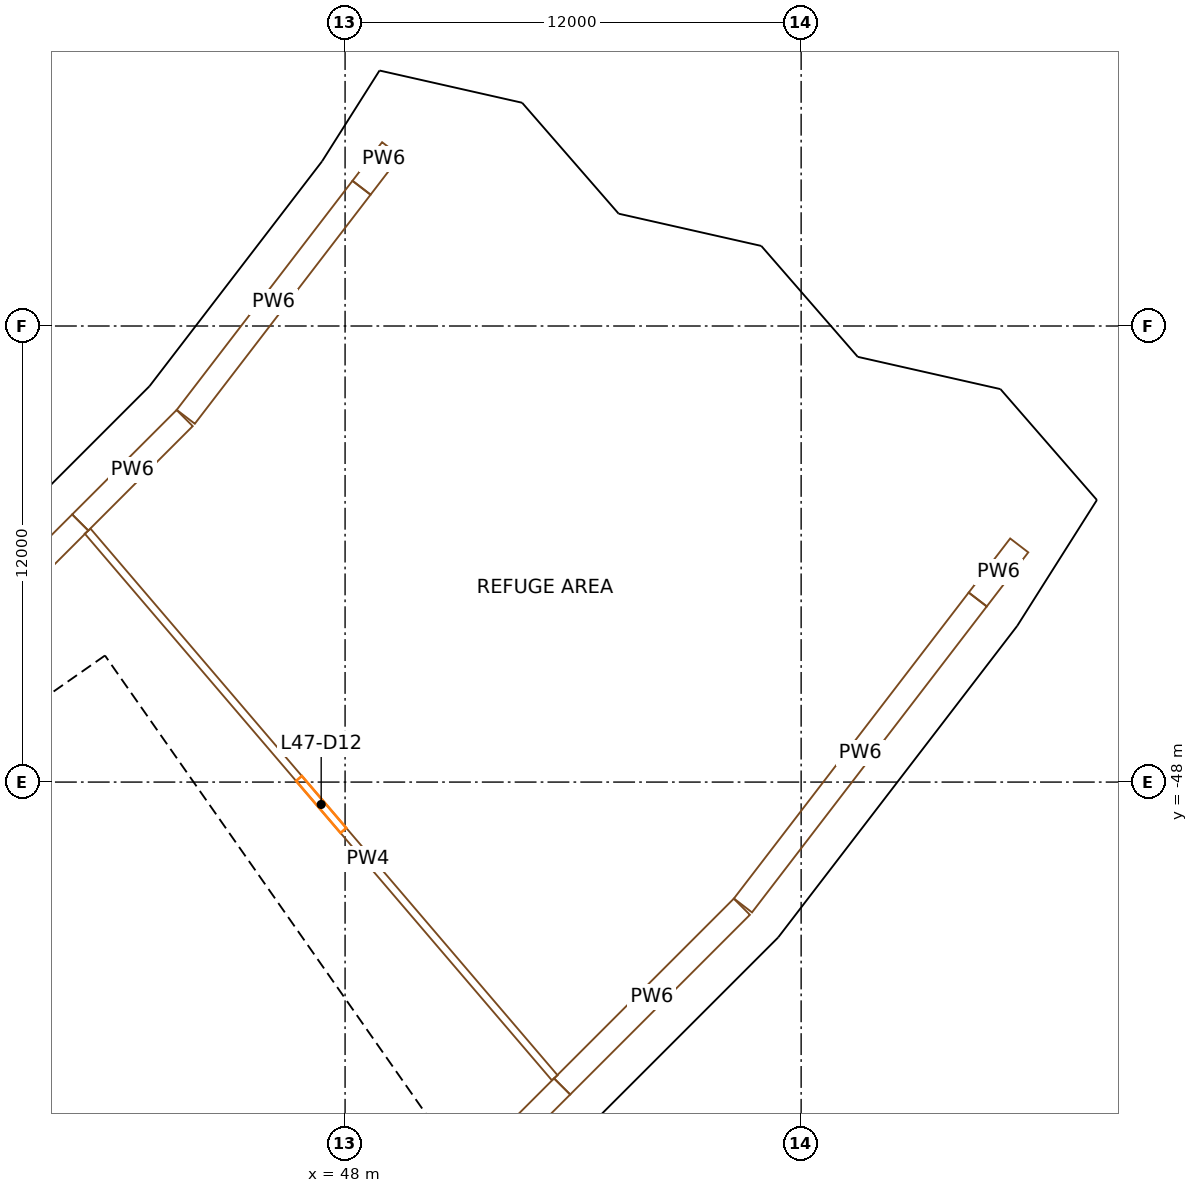
"""IFC4 building model, lengths in metres.
Left out: names, types, materials, properties, quantities, classifications, styles, units other than length and angle.
Written with IfcOpenShell. Run it as: python <this file> out.ifc"""

import sys

from ifc_helpers import new_model, si_unit, direction, frame, frame_2d, origin, origin_2d, place, context, subcontext, project, spatial, rectangle, extrude, element, fill, save


model = new_model("IFC4")
c1 = context("Model", 3, precision=1e-05, world=origin(), true_north=direction((0.0, 1.0)))
c2 = subcontext(c1, "Body", "Model", "MODEL_VIEW")
j1 = project(units=[si_unit("LENGTHUNIT", "METRE"), si_unit("PLANEANGLEUNIT", "RADIAN")], contexts=[c1])
p1 = place(None, origin())
s1 = spatial("IfcSite", under=j1, at=p1, CompositionType="ELEMENT")
p2 = place(p1, origin())
s2 = spatial("IfcBuilding", under=s1, at=p2, CompositionType="ELEMENT")
p3 = place(p2, frame((0.0, 0.0, 198.7)))
s3 = spatial("IfcBuildingStorey", under=s2, at=p3, CompositionType="ELEMENT", Elevation=198.7)
for number, where, z_axis, x_axis in (
    (1, (43.795, -38.407, 0.0), (0.0, 0.0, 1.0), (0.659, 0.752, 0.0)),
    (2, (58.456, -51.264, 0.0), (0.0, 0.0, 1.0), (0.659, 0.752, 0.0)),
    (3, (48.433, -32.362, 0.0), (0.0, 0.0, 1.0), (0.556, 0.831, 0.0)),
    (4, (64.647, -43.196, 0.0), (0.0, 0.0, 1.0), (0.556, 0.831, 0.0)),
):
    element("IfcColumn", number, at=place(p3, frame(where, z_axis=z_axis, x_axis=x_axis)), inside=s3, PredefinedType="COLUMN", context=c2, shape_type="SweptSolid", body=[
        extrude(rectangle(XDim=1.1, YDim=1.3, at=origin_2d()), origin(), (0.0, 0.0, 1.0), 5.0),
    ])
p4 = place(p3, frame((49.483, -57.031, 0.0), z_axis=(0.0, 0.0, 1.0), x_axis=(-0.573560421458, 0.819163257805, 0.0)))
e5 = element("IfcWall", 5, at=p4, inside=s3, PredefinedType="SHEAR", context=c2, shape_type="SweptSolid", body=[
    extrude(rectangle(XDim=14.2, YDim=0.6, at=frame_2d((7.1, 0.0))), origin(), (0.0, 0.0, 1.0), 4.7),
])
p5 = place(p4, frame((6.4, 0.0, 0.0)))
e6 = element("IfcOpeningElement", 6, at=p5, cuts=e5, PredefinedType="OPENING", context=c2, shape_type="SweptSolid", body=[
    extrude(rectangle(XDim=1.4, YDim=2.1, at=frame_2d((0.7, 1.05))), frame((0.0, 0.31, 0.0), z_axis=(0.0, -1.0, 0.0), x_axis=(1.0, 0.0, 0.0)), (0.0, 0.0, 1.0), 0.62),
])
p6 = place(p3, frame((28.941, -54.447, 0.0), z_axis=(0.0, 0.0, 1.0), x_axis=(0.819153391756, 0.573574511963, 0.0)))
e7 = element("IfcWall", 7, at=p6, inside=s3, PredefinedType="SHEAR", context=c2, shape_type="SweptSolid", body=[
    extrude(rectangle(XDim=15.045, YDim=0.6, at=frame_2d((7.523, 0.0))), origin(), (0.0, 0.0, 1.0), 4.7),
])
p7 = place(p6, frame((3.45, 0.0, 0.0)))
e8 = element("IfcOpeningElement", 8, at=p7, cuts=e7, PredefinedType="OPENING", context=c2, shape_type="SweptSolid", body=[
    extrude(rectangle(XDim=1.0, YDim=2.1, at=frame_2d((0.5, 1.05))), frame((0.0, 0.31, 0.0), z_axis=(0.0, -1.0, 0.0), x_axis=(1.0, 0.0, 0.0)), (0.0, 0.0, 1.0), 0.62),
])
p8 = place(p6, frame((13.495, 0.0, 0.0)))
e9 = element("IfcOpeningElement", 9, at=p8, cuts=e7, PredefinedType="OPENING", context=c2, shape_type="SweptSolid", body=[
    extrude(rectangle(XDim=1.1, YDim=2.1, at=frame_2d((0.55, 1.05))), frame((0.0, 0.31, 0.0), z_axis=(0.0, -1.0, 0.0), x_axis=(1.0, 0.0, 0.0)), (0.0, 0.0, 1.0), 0.62),
])
p9 = place(p3, frame((43.204, -60.696, 0.0), z_axis=(0.0, 0.0, 1.0), x_axis=(-0.573571992966, 0.819155155563, 0.0)))
e10 = element("IfcWall", 10, at=p9, inside=s3, PredefinedType="SOLIDWALL", context=c2, shape_type="SweptSolid", body=[
    extrude(rectangle(XDim=13.0, YDim=0.3, at=frame_2d((6.5, 0.0))), origin(), (0.0, 0.0, 1.0), 4.7),
])
p10 = place(p3, frame((33.787, -61.369, 0.0), z_axis=(0.0, 0.0, 1.0), x_axis=(0.819152564888, 0.573575692858, 0.0)))
e11 = element("IfcWall", 11, at=p10, inside=s3, PredefinedType="SOLIDWALL", context=c2, shape_type="SweptSolid", body=[
    extrude(rectangle(XDim=7.95, YDim=0.3, at=frame_2d((3.975, 0.0))), origin(), (0.0, 0.0, 1.0), 4.7),
])
p11 = place(p10, frame((0.675, 0.0, 0.0)))
e12 = element("IfcOpeningElement", 12, at=p11, cuts=e11, PredefinedType="OPENING", context=c2, shape_type="SweptSolid", body=[
    extrude(rectangle(XDim=1.1, YDim=2.1, at=frame_2d((0.55, 1.05))), frame((0.0, 0.16, 0.0), z_axis=(0.0, -1.0, 0.0), x_axis=(1.0, 0.0, 0.0)), (0.0, 0.0, 1.0), 0.32),
])
p12 = place(p10, frame((3.425, 0.0, 0.0)))
e13 = element("IfcOpeningElement", 13, at=p12, cuts=e11, PredefinedType="OPENING", context=c2, shape_type="SweptSolid", body=[
    extrude(rectangle(XDim=1.1, YDim=2.1, at=frame_2d((0.55, 1.05))), frame((0.0, 0.16, 0.0), z_axis=(0.0, -1.0, 0.0), x_axis=(1.0, 0.0, 0.0)), (0.0, 0.0, 1.0), 0.32),
])
p13 = place(p3, frame((37.936, -52.91, 0.0), z_axis=(0.0, 0.0, 1.0), x_axis=(0.819147518138, 0.57358290031, 0.0)))
e14 = element("IfcWall", 14, at=p13, inside=s3, PredefinedType="SOLIDWALL", context=c2, shape_type="SweptSolid", body=[
    extrude(rectangle(XDim=6.795, YDim=0.3, at=frame_2d((3.398, 0.0))), origin(), (0.0, 0.0, 1.0), 4.7),
])
p14 = place(p13, frame((5.32, 0.0, 0.0)))
e15 = element("IfcOpeningElement", 15, at=p14, cuts=e14, PredefinedType="OPENING", context=c2, shape_type="SweptSolid", body=[
    extrude(rectangle(XDim=1.1, YDim=2.1, at=frame_2d((0.55, 1.05))), frame((0.0, 0.16, 0.0), z_axis=(0.0, -1.0, 0.0), x_axis=(1.0, 0.0, 0.0)), (0.0, 0.0, 1.0), 0.32),
])
p15 = place(p3, frame((41.262, -57.661, 0.0), z_axis=(0.0, 0.0, 1.0), x_axis=(0.819164398642, 0.573558792102, 0.0)))
e16 = element("IfcWall", 16, at=p15, inside=s3, PredefinedType="SOLIDWALL", context=c2, shape_type="SweptSolid", body=[
    extrude(rectangle(XDim=6.795, YDim=0.3, at=frame_2d((3.397, 0.0))), origin(), (0.0, 0.0, 1.0), 4.7),
])
p16 = place(p15, frame((5.32, 0.0, 0.0)))
e17 = element("IfcOpeningElement", 17, at=p16, cuts=e16, PredefinedType="OPENING", context=c2, shape_type="SweptSolid", body=[
    extrude(rectangle(XDim=1.1, YDim=2.1, at=frame_2d((0.55, 1.05))), frame((0.0, 0.16, 0.0), z_axis=(0.0, -1.0, 0.0), x_axis=(1.0, 0.0, 0.0)), (0.0, 0.0, 1.0), 0.32),
])
p17 = place(p3, frame((39.599, -55.285, 0.0), z_axis=(0.0, 0.0, 1.0), x_axis=(0.819136323161, 0.573598887793, 0.0)))
e18 = element("IfcWall", 18, at=p17, inside=s3, PredefinedType="SOLIDWALL", context=c2, shape_type="SweptSolid", body=[
    extrude(rectangle(XDim=3.0, YDim=0.5, at=frame_2d((1.5, 0.0))), origin(), (0.0, 0.0, 1.0), 4.7),
])
p18 = place(p3, frame((43.757, -55.731, 0.0), z_axis=(0.0, 0.0, 1.0), x_axis=(-0.573536818435, 0.819179783625, 0.0)))
e19 = element("IfcWall", 19, at=p18, inside=s3, PredefinedType="SOLIDWALL", context=c2, shape_type="SweptSolid", body=[
    extrude(rectangle(XDim=5.5, YDim=0.3, at=frame_2d((2.75, 0.0))), origin(), (0.0, 0.0, 1.0), 4.7),
])
p19 = place(p18, frame((0.7, 0.0, 0.0)))
e20 = element("IfcOpeningElement", 20, at=p19, cuts=e19, PredefinedType="OPENING", context=c2, shape_type="SweptSolid", body=[
    extrude(rectangle(XDim=1.1, YDim=2.1, at=frame_2d((0.55, 1.05))), frame((0.0, 0.16, 0.0), z_axis=(0.0, -1.0, 0.0), x_axis=(1.0, 0.0, 0.0)), (0.0, 0.0, 1.0), 0.32),
])
p20 = place(p18, frame((3.7, 0.0, 0.0)))
e21 = element("IfcOpeningElement", 21, at=p20, cuts=e19, PredefinedType="OPENING", context=c2, shape_type="SweptSolid", body=[
    extrude(rectangle(XDim=1.1, YDim=2.1, at=frame_2d((0.55, 1.05))), frame((0.0, 0.16, 0.0), z_axis=(0.0, -1.0, 0.0), x_axis=(1.0, 0.0, 0.0)), (0.0, 0.0, 1.0), 0.32),
])
p21 = place(p3, frame((41.3, -47.96, 0.0), z_axis=(0.0, 0.0, 1.0), x_axis=(0.573495128918, -0.819208970354, 0.0)))
e22 = element("IfcWall", 22, at=p21, inside=s3, PredefinedType="SOLIDWALL", context=c2, shape_type="SweptSolid", body=[
    extrude(rectangle(XDim=0.5, YDim=0.3, at=frame_2d((0.25, 0.0))), origin(), (0.0, 0.0, 1.0), 2.3),
])
p22 = place(p3, frame((46.778, -55.782, 0.0), z_axis=(0.0, 0.0, 1.0), x_axis=(0.573822822947, -0.818979467304, 0.0)))
e23 = element("IfcWall", 23, at=p22, inside=s3, PredefinedType="SOLIDWALL", context=c2, shape_type="SweptSolid", body=[
    extrude(rectangle(XDim=0.5, YDim=0.3, at=frame_2d((0.25, 0.0))), origin(), (0.0, 0.0, 1.0), 2.3),
])
p23 = place(p3, frame((67.658, -40.74, 0.0), z_axis=(0.0, 0.0, 1.0), x_axis=(-0.656264128379, 0.754531241105, 0.0)))
e24 = element("IfcWall", 24, at=p23, inside=s3, PredefinedType="SOLIDWALL", context=c2, shape_type="SweptSolid", body=[
    extrude(rectangle(XDim=3.963, YDim=0.4, at=frame_2d((1.981, 0.0))), origin(), (0.0, 0.0, 1.0), 3.6),
])
p24 = place(p3, frame((64.927, -37.793, 0.0), z_axis=(0.0, 0.0, 1.0), x_axis=(-0.975379112734, 0.220534773769, 0.0)))
e25 = element("IfcWall", 25, at=p24, inside=s3, PredefinedType="SOLIDWALL", context=c2, shape_type="SweptSolid", body=[
    extrude(rectangle(XDim=3.42, YDim=0.4, at=frame_2d((1.71, 0.0))), origin(), (0.0, 0.0, 1.0), 3.6),
])
p25 = place(p3, frame((61.461, -37.083, 0.0), z_axis=(0.0, 0.0, 1.0), x_axis=(-0.656314062784, 0.754487807054, 0.0)))
e26 = element("IfcWall", 26, at=p25, inside=s3, PredefinedType="SOLIDWALL", context=c2, shape_type="SweptSolid", body=[
    extrude(rectangle(XDim=4.108, YDim=0.4, at=frame_2d((2.054, 0.0))), origin(), (0.0, 0.0, 1.0), 3.6),
])
p26 = place(p3, frame((58.634, -34.026, 0.0), z_axis=(0.0, 0.0, 1.0), x_axis=(-0.975395940272, 0.220460335892, 0.0)))
e27 = element("IfcWall", 27, at=p26, inside=s3, PredefinedType="SOLIDWALL", context=c2, shape_type="SweptSolid", body=[
    extrude(rectangle(XDim=3.419, YDim=0.4, at=frame_2d((1.709, 0.0))), origin(), (0.0, 0.0, 1.0), 3.6),
])
p27 = place(p3, frame((55.169, -33.316, 0.0), z_axis=(0.0, 0.0, 1.0), x_axis=(-0.65639050238, 0.754421306953, 0.0)))
e28 = element("IfcWall", 28, at=p27, inside=s3, PredefinedType="SOLIDWALL", context=c2, shape_type="SweptSolid", body=[
    extrude(rectangle(XDim=4.109, YDim=0.4, at=frame_2d((2.055, 0.0))), origin(), (0.0, 0.0, 1.0), 3.6),
])
p28 = place(p3, frame((52.341, -30.259, 0.0), z_axis=(0.0, 0.0, 1.0), x_axis=(-0.975428204724, 0.220317537723, 0.0)))
e29 = element("IfcWall", 29, at=p28, inside=s3, PredefinedType="SOLIDWALL", context=c2, shape_type="SweptSolid", body=[
    extrude(rectangle(XDim=3.174, YDim=0.4, at=frame_2d((1.587, 0.0))), origin(), (0.0, 0.0, 1.0), 3.6),
])
p29 = place(p3, frame((43.023, -37.697, 0.0), z_axis=(0.0, 0.0, 1.0), x_axis=(-0.707106781187, -0.707106781187, 0.0)))
e30 = element("IfcWall", 30, at=p29, inside=s3, PredefinedType="SOLIDWALL", context=c2, shape_type="SweptSolid", body=[
    extrude(rectangle(XDim=7.532, YDim=0.4, at=frame_2d((3.766, 0.0))), origin(), (0.0, 0.0, 1.0), 3.6),
])
p30 = place(p3, frame((47.535, -31.812, 0.0), z_axis=(0.0, 0.0, 1.0), x_axis=(-0.608765110442, -0.793350515415, 0.0)))
e31 = element("IfcWall", 31, at=p30, inside=s3, PredefinedType="SOLIDWALL", context=c2, shape_type="SweptSolid", body=[
    extrude(rectangle(XDim=7.39, YDim=0.4, at=frame_2d((3.695, 0.0))), origin(), (0.0, 0.0, 1.0), 3.6),
])
p31 = place(p3, frame((49.101, -29.344, 0.0), z_axis=(0.0, 0.0, 1.0), x_axis=(-0.534748237535, -0.845011433327, 0.0)))
e32 = element("IfcWall", 32, at=p31, inside=s3, PredefinedType="SOLIDWALL", context=c2, shape_type="SweptSolid", body=[
    extrude(rectangle(XDim=2.906, YDim=0.4, at=frame_2d((1.453, 0.0))), origin(), (0.0, 0.0, 1.0), 3.6),
])
p32 = place(p3, frame((51.992, -59.209, 0.0), z_axis=(0.0, 0.0, 1.0), x_axis=(0.707106781187, 0.707106781187, 0.0)))
e33 = element("IfcWall", 33, at=p32, inside=s3, PredefinedType="SOLIDWALL", context=c2, shape_type="SweptSolid", body=[
    extrude(rectangle(XDim=10.206, YDim=0.4, at=frame_2d((5.103, 0.0))), origin(), (0.0, 0.0, 1.0), 3.6),
])
p33 = place(p3, frame((59.229, -51.976, 0.0), z_axis=(0.0, 0.0, 1.0), x_axis=(0.608755645731, 0.793357777923, 0.0)))
e34 = element("IfcWall", 34, at=p33, inside=s3, PredefinedType="SOLIDWALL", context=c2, shape_type="SweptSolid", body=[
    extrude(rectangle(XDim=10.357, YDim=0.4, at=frame_2d((5.178, 0.0))), origin(), (0.0, 0.0, 1.0), 3.6),
])
p34 = place(p3, frame((65.542, -43.743, 0.0), z_axis=(0.0, 0.0, 1.0), x_axis=(0.534779828522, 0.844991440788, 0.0)))
e35 = element("IfcWall", 35, at=p34, inside=s3, PredefinedType="SOLIDWALL", context=c2, shape_type="SweptSolid", body=[
    extrude(rectangle(XDim=3.478, YDim=0.4, at=frame_2d((1.739, 0.0))), origin(), (0.0, 0.0, 1.0), 3.6),
])
p35 = place(p3, frame((38.423, -43.779, 0.0), z_axis=(0.0, 0.0, 1.0), x_axis=(0.707106781187, 0.707106781187, 0.0)))
e36 = element("IfcWall", 36, at=p35, inside=s3, PredefinedType="PARTITIONING", context=c2, shape_type="SweptSolid", body=[
    extrude(rectangle(XDim=3.689, YDim=0.6, at=frame_2d((1.845, 0.0))), origin(), (0.0, 0.0, 1.0), 3.6),
])
p36 = place(p3, frame((41.031, -41.17, 0.0), z_axis=(0.0, 0.0, 1.0), x_axis=(0.707106781187, 0.707106781187, 0.0)))
e37 = element("IfcWall", 37, at=p36, inside=s3, PredefinedType="PARTITIONING", context=c2, shape_type="SweptSolid", body=[
    extrude(rectangle(XDim=3.885, YDim=0.6, at=frame_2d((1.942, 0.0))), origin(), (0.0, 0.0, 1.0), 3.6),
])
p37 = place(p3, frame((41.227, -41.398, 0.0), z_axis=(0.0, 0.0, 1.0), x_axis=(0.64962900246, -0.760251378929, 0.0)))
e38 = element("IfcWall", 38, at=p37, inside=s3, PredefinedType="PARTITIONING", context=c2, shape_type="SweptSolid", body=[
    extrude(rectangle(XDim=18.918, YDim=0.2, at=frame_2d((9.459, 0.0))), origin(), (0.0, 0.0, 1.0), 3.6),
])
p38 = place(p37, frame((8.559, 0.0, 0.0)))
e39 = element("IfcOpeningElement", 39, at=p38, cuts=e38, PredefinedType="OPENING", context=c2, shape_type="SweptSolid", body=[
    extrude(rectangle(XDim=1.8, YDim=2.4, at=frame_2d((0.9, 1.2))), frame((0.0, 0.11, 0.0), z_axis=(0.0, -1.0, 0.0), x_axis=(1.0, 0.0, 0.0)), (0.0, 0.0, 1.0), 0.22),
])
p39 = place(p3, frame((43.808, -38.389, 0.0), z_axis=(0.0, 0.0, 1.0), x_axis=(0.608775025132, 0.793342907434, 0.0)))
e40 = element("IfcWall", 40, at=p39, inside=s3, PredefinedType="PARTITIONING", context=c2, shape_type="SweptSolid", body=[
    extrude(rectangle(XDim=7.594, YDim=0.6, at=frame_2d((3.797, 0.0))), origin(), (0.0, 0.0, 1.0), 3.6),
])
p40 = place(p3, frame((48.435, -32.36, 0.0), z_axis=(0.0, 0.0, 1.0), x_axis=(0.608832773677, 0.793298590505, 0.0)))
e41 = element("IfcWall", 41, at=p40, inside=s3, PredefinedType="PARTITIONING", context=c2, shape_type="SweptSolid", body=[
    extrude(rectangle(XDim=1.277, YDim=0.6, at=frame_2d((0.639, 0.0))), origin(), (0.0, 0.0, 1.0), 3.6),
])
p41 = place(p3, frame((51.28, -58.439, 0.0), z_axis=(0.0, 0.0, 1.0), x_axis=(0.707106781187, 0.707106781187, 0.0)))
e42 = element("IfcWall", 42, at=p41, inside=s3, PredefinedType="PARTITIONING", context=c2, shape_type="SweptSolid", body=[
    extrude(rectangle(XDim=3.438, YDim=0.6, at=frame_2d((1.719, 0.0))), origin(), (0.0, 0.0, 1.0), 3.6),
])
p42 = place(p3, frame((53.711, -56.009, 0.0), z_axis=(0.0, 0.0, 1.0), x_axis=(0.707106781187, 0.707106781187, 0.0)))
e43 = element("IfcWall", 43, at=p42, inside=s3, PredefinedType="PARTITIONING", context=c2, shape_type="SweptSolid", body=[
    extrude(rectangle(XDim=6.687, YDim=0.6, at=frame_2d((3.343, 0.0))), origin(), (0.0, 0.0, 1.0), 3.6),
])
p43 = place(p3, frame((58.469, -51.246, 0.0), z_axis=(0.0, 0.0, 1.0), x_axis=(0.608777573681, 0.793340951787, 0.0)))
e44 = element("IfcWall", 44, at=p43, inside=s3, PredefinedType="PARTITIONING", context=c2, shape_type="SweptSolid", body=[
    extrude(rectangle(XDim=10.145, YDim=0.6, at=frame_2d((5.072, 0.0))), origin(), (0.0, 0.0, 1.0), 3.6),
])
p44 = place(p3, frame((64.649, -43.193, 0.0), z_axis=(0.0, 0.0, 1.0), x_axis=(0.608714977596, 0.793388981554, 0.0)))
e45 = element("IfcWall", 45, at=p44, inside=s3, PredefinedType="PARTITIONING", context=c2, shape_type="SweptSolid", body=[
    extrude(rectangle(XDim=1.79, YDim=0.6, at=frame_2d((0.895, 0.0))), origin(), (0.0, 0.0, 1.0), 3.6),
])
p45 = place(p19, origin())
e46 = element("IfcDoor", 46, at=p45, inside=s3, OperationType="DOUBLE_DOOR_SLIDING", PredefinedType="DOOR", context=c2, shape_type="SweptSolid", body=[
    extrude(rectangle(XDim=1.1, YDim=2.1, at=frame_2d((0.55, 1.05))), frame((0.0, 0.025, 0.0), z_axis=(0.0, -1.0, 0.0), x_axis=(1.0, 0.0, 0.0)), (0.0, 0.0, 1.0), 0.05),
])
fill(e20, e46)
p46 = place(p20, origin())
e47 = element("IfcDoor", 47, at=p46, inside=s3, OperationType="DOUBLE_DOOR_SLIDING", PredefinedType="DOOR", context=c2, shape_type="SweptSolid", body=[
    extrude(rectangle(XDim=1.1, YDim=2.1, at=frame_2d((0.55, 1.05))), frame((0.0, 0.025, 0.0), z_axis=(0.0, -1.0, 0.0), x_axis=(1.0, 0.0, 0.0)), (0.0, 0.0, 1.0), 0.05),
])
fill(e21, e47)
p47 = place(p5, origin())
e48 = element("IfcDoor", 48, at=p47, inside=s3, OperationType="DOUBLE_DOOR_SINGLE_SWING", PredefinedType="DOOR", context=c2, shape_type="SweptSolid", body=[
    extrude(rectangle(XDim=1.4, YDim=2.1, at=frame_2d((0.7, 1.05))), frame((0.0, 0.025, 0.0), z_axis=(0.0, -1.0, 0.0), x_axis=(1.0, 0.0, 0.0)), (0.0, 0.0, 1.0), 0.05),
])
fill(e6, e48)
p48 = place(p8, origin())
e49 = element("IfcDoor", 49, at=p48, inside=s3, OperationType="SINGLE_SWING_RIGHT", PredefinedType="DOOR", context=c2, shape_type="SweptSolid", body=[
    extrude(rectangle(XDim=1.1, YDim=2.1, at=frame_2d((0.55, 1.05))), frame((0.0, 0.025, 0.0), z_axis=(0.0, -1.0, 0.0), x_axis=(1.0, 0.0, 0.0)), (0.0, 0.0, 1.0), 0.05),
])
fill(e9, e49)
p49 = place(p14, origin())
e50 = element("IfcDoor", 50, at=p49, inside=s3, OperationType="SINGLE_SWING_LEFT", PredefinedType="DOOR", context=c2, shape_type="SweptSolid", body=[
    extrude(rectangle(XDim=1.1, YDim=2.1, at=frame_2d((0.55, 1.05))), frame((0.0, 0.025, 0.0), z_axis=(0.0, -1.0, 0.0), x_axis=(1.0, 0.0, 0.0)), (0.0, 0.0, 1.0), 0.05),
])
fill(e15, e50)
p50 = place(p16, origin())
e51 = element("IfcDoor", 51, at=p50, inside=s3, OperationType="SINGLE_SWING_LEFT", PredefinedType="DOOR", context=c2, shape_type="SweptSolid", body=[
    extrude(rectangle(XDim=1.1, YDim=2.1, at=frame_2d((0.55, 1.05))), frame((0.0, 0.025, 0.0), z_axis=(0.0, -1.0, 0.0), x_axis=(1.0, 0.0, 0.0)), (0.0, 0.0, 1.0), 0.05),
])
fill(e17, e51)
p51 = place(p38, origin())
e52 = element("IfcDoor", 52, at=p51, inside=s3, OperationType="DOUBLE_DOOR_SINGLE_SWING", PredefinedType="DOOR", context=c2, shape_type="SweptSolid", body=[
    extrude(rectangle(XDim=1.8, YDim=2.4, at=frame_2d((0.9, 1.2))), frame((0.0, 0.025, 0.0), z_axis=(0.0, -1.0, 0.0), x_axis=(1.0, 0.0, 0.0)), (0.0, 0.0, 1.0), 0.05),
])
fill(e39, e52)
save(model, sys.argv[1])
